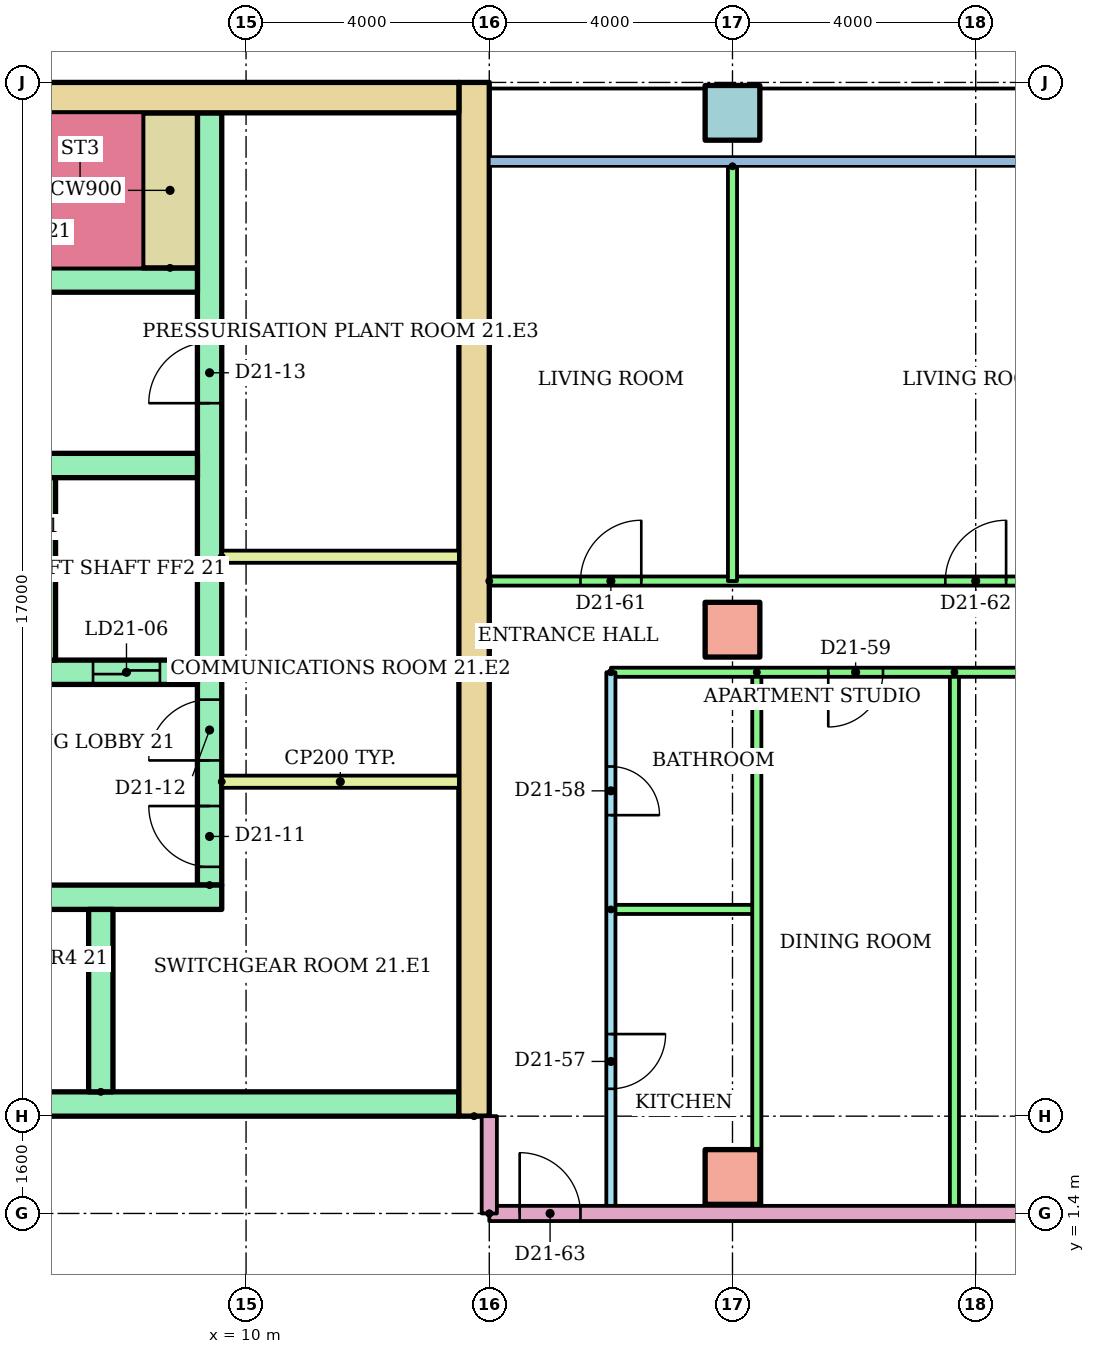
"""IFC4 building model, lengths in metres.
Left out: names, types, materials, properties, quantities, classifications, styles, units other than length and angle.
Written with IfcOpenShell. Run it as: python <this file> out.ifc"""

import sys

from ifc_helpers import new_model, si_unit, direction, frame, frame_2d, origin, origin_2d, place, context, subcontext, project, spatial, rectangle, hollow_rectangle, extrude, element, fill, save


model = new_model("IFC4")
c1 = context("Model", 3, precision=1e-05, world=origin(), true_north=direction((0.0, 1.0)))
c2 = subcontext(c1, "Body", "Model", "MODEL_VIEW")
j1 = project(units=[si_unit("LENGTHUNIT", "METRE"), si_unit("PLANEANGLEUNIT", "RADIAN")], contexts=[c1])
p1 = place(None, origin())
s1 = spatial("IfcSite", under=j1, at=p1, CompositionType="ELEMENT")
p2 = place(p1, origin())
s2 = spatial("IfcBuilding", under=s1, at=p2, CompositionType="ELEMENT")
p3 = place(p2, frame((0.0, 0.0, 83.9)))
s3 = spatial("IfcBuildingStorey", under=s2, at=p3, CompositionType="ELEMENT", Elevation=83.9)
for number, where in (
    (1, (18.0, 2.0, 0.0)),
    (2, (18.0, 11.0, 0.0)),
):
    element("IfcColumn", number, at=place(p3, frame(where)), inside=s3, PredefinedType="COLUMN", context=c2, shape_type="SweptSolid", body=[
        extrude(rectangle(XDim=0.9, YDim=0.9, at=origin_2d()), origin(), (0.0, 0.0, 1.0), 3.2),
    ])
p4 = place(p3, frame((18.0, 19.5, 0.0)))
e3 = element("IfcColumn", 3, at=p4, inside=s3, PredefinedType="COLUMN", context=c2, shape_type="SweptSolid", body=[
    extrude(hollow_rectangle(XDim=0.9, YDim=0.9, WallThickness=0.045, at=origin_2d()), origin(), (0.0, 0.0, 1.0), 3.2),
])
p5 = place(p3, frame((13.75, 3.0, 0.0), z_axis=(0.0, 0.0, 1.0), x_axis=(0.0, 1.0, 0.0)))
e4 = element("IfcWall", 4, at=p5, inside=s3, PredefinedType="SHEAR", context=c2, shape_type="SweptSolid", body=[
    extrude(rectangle(XDim=17.0, YDim=0.5, at=frame_2d((8.5, 0.0))), origin(), (0.0, 0.0, 1.0), 2.92),
])
p6 = place(p3, frame((-13.5, 19.75, 0.0)))
e5 = element("IfcWall", 5, at=p6, inside=s3, PredefinedType="SHEAR", context=c2, shape_type="SweptSolid", body=[
    extrude(rectangle(XDim=27.0, YDim=0.5, at=frame_2d((13.5, 0.0))), origin(), (0.0, 0.0, 1.0), 2.92),
])
p7 = place(p3, frame((9.4, 6.8, 0.0), z_axis=(0.0, 0.0, 1.0), x_axis=(0.0, 1.0, 0.0)))
e6 = element("IfcWall", 6, at=p7, inside=s3, PredefinedType="SHEAR", context=c2, shape_type="SweptSolid", body=[
    extrude(rectangle(XDim=12.7, YDim=0.4, at=frame_2d((6.35, 0.0))), origin(), (0.0, 0.0, 1.0), 2.92),
])
p8 = place(p7, frame((0.3, 0.0, 0.0)))
e7 = element("IfcOpeningElement", 7, at=p8, cuts=e6, PredefinedType="OPENING", context=c2, shape_type="SweptSolid", body=[
    extrude(rectangle(XDim=1.0, YDim=2.1, at=frame_2d((0.5, 1.05))), frame((0.0, 0.21, 0.0), z_axis=(0.0, -1.0, 0.0), x_axis=(1.0, 0.0, 0.0)), (0.0, 0.0, 1.0), 0.42),
])
p9 = place(p7, frame((2.05, 0.0, 0.0)))
e8 = element("IfcOpeningElement", 8, at=p9, cuts=e6, PredefinedType="OPENING", context=c2, shape_type="SweptSolid", body=[
    extrude(rectangle(XDim=1.0, YDim=2.1, at=frame_2d((0.5, 1.05))), frame((0.0, 0.21, 0.0), z_axis=(0.0, -1.0, 0.0), x_axis=(1.0, 0.0, 0.0)), (0.0, 0.0, 1.0), 0.42),
])
p10 = place(p7, frame((7.925, 0.0, 0.0)))
e9 = element("IfcOpeningElement", 9, at=p10, cuts=e6, PredefinedType="OPENING", context=c2, shape_type="SweptSolid", body=[
    extrude(rectangle(XDim=1.0, YDim=2.1, at=frame_2d((0.5, 1.05))), frame((0.0, 0.21, 0.0), z_axis=(0.0, -1.0, 0.0), x_axis=(1.0, 0.0, 0.0)), (0.0, 0.0, 1.0), 0.42),
])
p11 = place(p3, frame((-13.5, 3.2, 0.0)))
e10 = element("IfcWall", 10, at=p11, inside=s3, PredefinedType="SHEAR", context=c2, shape_type="SweptSolid", body=[
    extrude(rectangle(XDim=27.0, YDim=0.4, at=frame_2d((13.5, 0.0))), origin(), (0.0, 0.0, 1.0), 2.92),
])
p12 = place(p11, frame((6.861, 0.0, 0.0)))
e11 = element("IfcOpeningElement", 11, at=p12, cuts=e10, PredefinedType="OPENING", context=c2, shape_type="SweptSolid", body=[
    extrude(rectangle(XDim=1.1, YDim=2.1, at=frame_2d((0.55, 1.05))), frame((0.0, 0.21, 0.0), z_axis=(0.0, -1.0, 0.0), x_axis=(1.0, 0.0, 0.0)), (0.0, 0.0, 1.0), 0.42),
])
p13 = place(p11, frame((9.906, 0.0, 0.0)))
e12 = element("IfcOpeningElement", 12, at=p13, cuts=e10, PredefinedType="OPENING", context=c2, shape_type="SweptSolid", body=[
    extrude(rectangle(XDim=1.1, YDim=2.1, at=frame_2d((0.55, 1.05))), frame((0.0, 0.21, 0.0), z_axis=(0.0, -1.0, 0.0), x_axis=(1.0, 0.0, 0.0)), (0.0, 0.0, 1.0), 0.42),
])
p14 = place(p11, frame((15.994, 0.0, 0.0)))
e13 = element("IfcOpeningElement", 13, at=p14, cuts=e10, PredefinedType="OPENING", context=c2, shape_type="SweptSolid", body=[
    extrude(rectangle(XDim=1.1, YDim=2.1, at=frame_2d((0.55, 1.05))), frame((0.0, 0.21, 0.0), z_axis=(0.0, -1.0, 0.0), x_axis=(1.0, 0.0, 0.0)), (0.0, 0.0, 1.0), 0.42),
])
p15 = place(p11, frame((19.039, 0.0, 0.0)))
e14 = element("IfcOpeningElement", 14, at=p15, cuts=e10, PredefinedType="OPENING", context=c2, shape_type="SweptSolid", body=[
    extrude(rectangle(XDim=1.1, YDim=2.1, at=frame_2d((0.55, 1.05))), frame((0.0, 0.21, 0.0), z_axis=(0.0, -1.0, 0.0), x_axis=(1.0, 0.0, 0.0)), (0.0, 0.0, 1.0), 0.42),
])
p16 = place(p11, frame((12.6, 0.0, 0.0)))
e15 = element("IfcOpeningElement", 15, at=p16, cuts=e10, PredefinedType="OPENING", context=c2, shape_type="SweptSolid", body=[
    extrude(rectangle(XDim=1.8, YDim=2.1, at=frame_2d((0.9, 1.05))), frame((0.0, 0.21, 0.0), z_axis=(0.0, -1.0, 0.0), x_axis=(1.0, 0.0, 0.0)), (0.0, 0.0, 1.0), 0.42),
])
p17 = place(p3, frame((1.522, 6.6, 0.0)))
e16 = element("IfcWall", 16, at=p17, inside=s3, PredefinedType="SHEAR", context=c2, shape_type="SweptSolid", body=[
    extrude(rectangle(XDim=8.078, YDim=0.4, at=frame_2d((4.039, 0.0))), origin(), (0.0, 0.0, 1.0), 2.92),
])
p18 = place(p3, frame((7.611, 3.4, 0.0), z_axis=(0.0, 0.0, 1.0), x_axis=(0.0, 1.0, 0.0)))
e17 = element("IfcWall", 17, at=p18, inside=s3, PredefinedType="SHEAR", context=c2, shape_type="SweptSolid", body=[
    extrude(rectangle(XDim=3.0, YDim=0.4, at=frame_2d((1.5, 0.0))), origin(), (0.0, 0.0, 1.0), 2.92),
])
p19 = place(p3, frame((1.2, 10.3, 0.0)))
e18 = element("IfcWall", 18, at=p19, inside=s3, PredefinedType="SHEAR", context=c2, shape_type="SweptSolid", body=[
    extrude(rectangle(XDim=8.0, YDim=0.4, at=frame_2d((4.0, 0.0))), origin(), (0.0, 0.0, 1.0), 2.92),
])
p20 = place(p19, frame((3.55, 0.0, 0.0)))
e19 = element("IfcOpeningElement", 19, at=p20, cuts=e18, PredefinedType="OPENING", context=c2, shape_type="SweptSolid", body=[
    extrude(rectangle(XDim=1.1, YDim=2.1, at=frame_2d((0.55, 1.05))), frame((0.0, 0.21, 0.0), z_axis=(0.0, -1.0, 0.0), x_axis=(1.0, 0.0, 0.0)), (0.0, 0.0, 1.0), 0.42),
])
p21 = place(p19, frame((6.283, 0.0, 0.0)))
e20 = element("IfcOpeningElement", 20, at=p21, cuts=e18, PredefinedType="OPENING", context=c2, shape_type="SweptSolid", body=[
    extrude(rectangle(XDim=1.1, YDim=2.1, at=frame_2d((0.55, 1.05))), frame((0.0, 0.21, 0.0), z_axis=(0.0, -1.0, 0.0), x_axis=(1.0, 0.0, 0.0)), (0.0, 0.0, 1.0), 0.42),
])
p22 = place(p19, frame((0.867, 0.0, 0.0)))
e21 = element("IfcOpeningElement", 21, at=p22, cuts=e18, PredefinedType="OPENING", context=c2, shape_type="SweptSolid", body=[
    extrude(rectangle(XDim=1.0, YDim=2.1, at=frame_2d((0.5, 1.05))), frame((0.0, 0.21, 0.0), z_axis=(0.0, -1.0, 0.0), x_axis=(1.0, 0.0, 0.0)), (0.0, 0.0, 1.0), 0.42),
])
p23 = place(p3, frame((1.2, 13.7, 0.0)))
e22 = element("IfcWall", 22, at=p23, inside=s3, PredefinedType="SHEAR", context=c2, shape_type="SweptSolid", body=[
    extrude(rectangle(XDim=8.0, YDim=0.4, at=frame_2d((4.0, 0.0))), origin(), (0.0, 0.0, 1.0), 2.92),
])
p24 = place(p3, frame((6.667, 10.5, 0.0), z_axis=(0.0, 0.0, 1.0), x_axis=(0.0, 1.0, 0.0)))
e23 = element("IfcWall", 23, at=p24, inside=s3, PredefinedType="SHEAR", context=c2, shape_type="SweptSolid", body=[
    extrude(rectangle(XDim=3.0, YDim=0.4, at=frame_2d((1.5, 0.0))), origin(), (0.0, 0.0, 1.0), 2.92),
])
p25 = place(p3, frame((-9.2, 16.75, 0.0)))
e24 = element("IfcWall", 24, at=p25, inside=s3, PredefinedType="SHEAR", context=c2, shape_type="SweptSolid", body=[
    extrude(rectangle(XDim=18.4, YDim=0.4, at=frame_2d((9.2, 0.0))), origin(), (0.0, 0.0, 1.0), 2.92),
])
p26 = place(p25, frame((0.1, 0.0, 0.0)))
e25 = element("IfcOpeningElement", 25, at=p26, cuts=e24, PredefinedType="OPENING", context=c2, shape_type="SweptSolid", body=[
    extrude(rectangle(XDim=0.95, YDim=2.1, at=frame_2d((0.475, 1.05))), frame((0.0, 0.21, 0.0), z_axis=(0.0, -1.0, 0.0), x_axis=(1.0, 0.0, 0.0)), (0.0, 0.0, 1.0), 0.42),
])
p27 = place(p25, frame((6.1, 0.0, 0.0)))
e26 = element("IfcOpeningElement", 26, at=p27, cuts=e24, PredefinedType="OPENING", context=c2, shape_type="SweptSolid", body=[
    extrude(rectangle(XDim=0.95, YDim=2.1, at=frame_2d((0.475, 1.05))), frame((0.0, 0.21, 0.0), z_axis=(0.0, -1.0, 0.0), x_axis=(1.0, 0.0, 0.0)), (0.0, 0.0, 1.0), 0.42),
])
p28 = place(p25, frame((12.1, 0.0, 0.0)))
e27 = element("IfcOpeningElement", 27, at=p28, cuts=e24, PredefinedType="OPENING", context=c2, shape_type="SweptSolid", body=[
    extrude(rectangle(XDim=0.95, YDim=2.1, at=frame_2d((0.475, 1.05))), frame((0.0, 0.21, 0.0), z_axis=(0.0, -1.0, 0.0), x_axis=(1.0, 0.0, 0.0)), (0.0, 0.0, 1.0), 0.42),
])
p29 = place(p3, frame((8.75, 16.95, 0.0), z_axis=(0.0, 0.0, 1.0), x_axis=(0.0, 1.0, 0.0)))
e28 = element("IfcWall", 28, at=p29, inside=s3, PredefinedType="SHEAR", context=c2, shape_type="SweptSolid", body=[
    extrude(rectangle(XDim=2.55, YDim=0.9, at=frame_2d((1.275, 0.0))), origin(), (0.0, 0.0, 1.0), 2.92),
])
for number, where in (
    (29, (9.6, 8.5, 0.0)),
    (30, (9.6, 12.2, 0.0)),
):
    element("IfcWall", number, at=place(p3, frame(where)), inside=s3, PredefinedType="PARTITIONING", context=c2, shape_type="SweptSolid", body=[
        extrude(rectangle(XDim=3.9, YDim=0.2, at=frame_2d((1.95, 0.0))), origin(), (0.0, 0.0, 1.0), 2.92),
    ])
p30 = place(p3, frame((16.0, 10.3, 0.0), z_axis=(0.0, 0.0, 1.0), x_axis=(0.0, -1.0, 0.0)))
e31 = element("IfcWall", 31, at=p30, inside=s3, PredefinedType="PARTITIONING", context=c2, shape_type="SweptSolid", body=[
    extrude(rectangle(XDim=8.9, YDim=0.15, at=frame_2d((4.45, 0.0))), origin(), (0.0, 0.0, 1.0), 2.4),
])
p31 = place(p30, frame((5.95, 0.0, 0.0)))
e32 = element("IfcOpeningElement", 32, at=p31, cuts=e31, PredefinedType="OPENING", context=c2, shape_type="SweptSolid", body=[
    extrude(rectangle(XDim=0.9, YDim=2.1, at=frame_2d((0.45, 1.05))), frame((0.0, 0.085, 0.0), z_axis=(0.0, -1.0, 0.0), x_axis=(1.0, 0.0, 0.0)), (0.0, 0.0, 1.0), 0.17),
])
p32 = place(p30, frame((1.55, 0.0, 0.0)))
e33 = element("IfcOpeningElement", 33, at=p32, cuts=e31, PredefinedType="OPENING", context=c2, shape_type="SweptSolid", body=[
    extrude(rectangle(XDim=0.8, YDim=2.1, at=frame_2d((0.4, 1.05))), frame((0.0, 0.085, 0.0), z_axis=(0.0, -1.0, 0.0), x_axis=(1.0, 0.0, 0.0)), (0.0, 0.0, 1.0), 0.17),
])
p33 = place(p3, frame((16.0, 6.4, 0.0)))
e34 = element("IfcWall", 34, at=p33, inside=s3, PredefinedType="PARTITIONING", context=c2, shape_type="SweptSolid", body=[
    extrude(rectangle(XDim=2.4, YDim=0.15, at=frame_2d((1.2, 0.0))), origin(), (0.0, 0.0, 1.0), 2.4),
])
for number, where, z_axis, x_axis in (
    (35, (18.4, 10.3, 0.0), (0.0, 0.0, 1.0), (0.0, -1.0, 0.0)),
    (36, (21.65, 10.3, 0.0), (0.0, 0.0, 1.0), (0.0, -1.0, 0.0)),
):
    element("IfcWall", number, at=place(p3, frame(where, z_axis=z_axis, x_axis=x_axis)), inside=s3, PredefinedType="PARTITIONING", context=c2, shape_type="SweptSolid", body=[
        extrude(rectangle(XDim=8.9, YDim=0.15, at=frame_2d((4.45, 0.0))), origin(), (0.0, 0.0, 1.0), 2.4),
    ])
p34 = place(p3, frame((26.0, 10.3, 0.0), z_axis=(0.0, 0.0, 1.0), x_axis=(-1.0, 0.0, 0.0)))
e37 = element("IfcWall", 37, at=p34, inside=s3, PredefinedType="PARTITIONING", context=c2, shape_type="SweptSolid", body=[
    extrude(rectangle(XDim=10.0, YDim=0.15, at=frame_2d((5.0, 0.0))), origin(), (0.0, 0.0, 1.0), 2.4),
])
p35 = place(p34, frame((5.525, 0.0, 0.0)))
e38 = element("IfcOpeningElement", 38, at=p35, cuts=e37, PredefinedType="OPENING", context=c2, shape_type="SweptSolid", body=[
    extrude(rectangle(XDim=0.9, YDim=2.1, at=frame_2d((0.45, 1.05))), frame((0.0, 0.085, 0.0), z_axis=(0.0, -1.0, 0.0), x_axis=(1.0, 0.0, 0.0)), (0.0, 0.0, 1.0), 0.17),
])
p36 = place(p34, frame((1.725, 0.0, 0.0)))
e39 = element("IfcOpeningElement", 39, at=p36, cuts=e37, PredefinedType="OPENING", context=c2, shape_type="SweptSolid", body=[
    extrude(rectangle(XDim=0.9, YDim=2.1, at=frame_2d((0.45, 1.05))), frame((0.0, 0.085, 0.0), z_axis=(0.0, -1.0, 0.0), x_axis=(1.0, 0.0, 0.0)), (0.0, 0.0, 1.0), 0.17),
])
p37 = place(p3, frame((14.0, 11.8, 0.0)))
e40 = element("IfcWall", 40, at=p37, inside=s3, PredefinedType="PARTITIONING", context=c2, shape_type="SweptSolid", body=[
    extrude(rectangle(XDim=12.0, YDim=0.15, at=frame_2d((6.0, 0.0))), origin(), (0.0, 0.0, 1.0), 2.4),
])
p38 = place(p37, frame((1.5, 0.0, 0.0)))
e41 = element("IfcOpeningElement", 41, at=p38, cuts=e40, PredefinedType="OPENING", context=c2, shape_type="SweptSolid", body=[
    extrude(rectangle(XDim=1.0, YDim=2.1, at=frame_2d((0.5, 1.05))), frame((0.0, 0.085, 0.0), z_axis=(0.0, -1.0, 0.0), x_axis=(1.0, 0.0, 0.0)), (0.0, 0.0, 1.0), 0.17),
])
p39 = place(p37, frame((7.5, 0.0, 0.0)))
e42 = element("IfcOpeningElement", 42, at=p39, cuts=e40, PredefinedType="OPENING", context=c2, shape_type="SweptSolid", body=[
    extrude(rectangle(XDim=1.0, YDim=2.1, at=frame_2d((0.5, 1.05))), frame((0.0, 0.085, 0.0), z_axis=(0.0, -1.0, 0.0), x_axis=(1.0, 0.0, 0.0)), (0.0, 0.0, 1.0), 0.17),
])
p40 = place(p3, frame((18.0, 18.621, 0.0), z_axis=(0.0, 0.0, 1.0), x_axis=(0.0, -1.0, 0.0)))
e43 = element("IfcWall", 43, at=p40, inside=s3, PredefinedType="PARTITIONING", context=c2, shape_type="SweptSolid", body=[
    extrude(rectangle(XDim=6.821, YDim=0.15, at=frame_2d((3.411, 0.0))), origin(), (0.0, 0.0, 1.0), 2.4),
])
p41 = place(p3, frame((14.0, 1.4, 0.0)))
e44 = element("IfcWall", 44, at=p41, inside=s3, PredefinedType="PARTITIONING", context=c2, shape_type="SweptSolid", body=[
    extrude(rectangle(XDim=15.0, YDim=0.25, at=frame_2d((7.5, 0.0))), origin(), (0.0, 0.0, 1.0), 2.4),
])
p42 = place(p41, frame((0.5, 0.0, 0.0)))
e45 = element("IfcOpeningElement", 45, at=p42, cuts=e44, PredefinedType="OPENING", context=c2, shape_type="SweptSolid", body=[
    extrude(rectangle(XDim=1.0, YDim=2.1, at=frame_2d((0.5, 1.05))), frame((0.0, 0.135, 0.0), z_axis=(0.0, -1.0, 0.0), x_axis=(1.0, 0.0, 0.0)), (0.0, 0.0, 1.0), 0.27),
])
p43 = place(p41, frame((12.689, 0.0, 0.0)))
e46 = element("IfcOpeningElement", 46, at=p43, cuts=e44, PredefinedType="OPENING", context=c2, shape_type="SweptSolid", body=[
    extrude(rectangle(XDim=1.0, YDim=2.1, at=frame_2d((0.5, 1.05))), frame((0.0, 0.135, 0.0), z_axis=(0.0, -1.0, 0.0), x_axis=(1.0, 0.0, 0.0)), (0.0, 0.0, 1.0), 0.27),
])
p44 = place(p3, frame((14.0, 1.4, 0.0), z_axis=(0.0, 0.0, 1.0), x_axis=(0.0, 1.0, 0.0)))
e47 = element("IfcWall", 47, at=p44, inside=s3, PredefinedType="PARTITIONING", context=c2, shape_type="SweptSolid", body=[
    extrude(rectangle(XDim=1.6, YDim=0.25, at=frame_2d((0.8, 0.0))), origin(), (0.0, 0.0, 1.0), 2.4),
])
p45 = place(p21, origin())
e48 = element("IfcDoor", 48, at=p45, inside=s3, OperationType="SLIDING_TO_LEFT", PredefinedType="DOOR", context=c2, shape_type="SweptSolid", body=[
    extrude(rectangle(XDim=1.1, YDim=2.1, at=frame_2d((0.55, 1.05))), frame((0.0, 0.025, 0.0), z_axis=(0.0, -1.0, 0.0), x_axis=(1.0, 0.0, 0.0)), (0.0, 0.0, 1.0), 0.05),
])
fill(e20, e48)
p46 = place(p8, origin())
e49 = element("IfcDoor", 49, at=p46, inside=s3, OperationType="SINGLE_SWING_RIGHT", PredefinedType="DOOR", context=c2, shape_type="SweptSolid", body=[
    extrude(rectangle(XDim=1.0, YDim=2.1, at=frame_2d((0.5, 1.05))), frame((0.0, 0.025, 0.0), z_axis=(0.0, -1.0, 0.0), x_axis=(1.0, 0.0, 0.0)), (0.0, 0.0, 1.0), 0.05),
])
fill(e7, e49)
p47 = place(p9, origin())
e50 = element("IfcDoor", 50, at=p47, inside=s3, OperationType="SINGLE_SWING_LEFT", PredefinedType="DOOR", context=c2, shape_type="SweptSolid", body=[
    extrude(rectangle(XDim=1.0, YDim=2.1, at=frame_2d((0.5, 1.05))), frame((0.0, 0.025, 0.0), z_axis=(0.0, -1.0, 0.0), x_axis=(1.0, 0.0, 0.0)), (0.0, 0.0, 1.0), 0.05),
])
fill(e8, e50)
p48 = place(p10, origin())
e51 = element("IfcDoor", 51, at=p48, inside=s3, OperationType="SINGLE_SWING_LEFT", PredefinedType="DOOR", context=c2, shape_type="SweptSolid", body=[
    extrude(rectangle(XDim=1.0, YDim=2.1, at=frame_2d((0.5, 1.05))), frame((0.0, 0.025, 0.0), z_axis=(0.0, -1.0, 0.0), x_axis=(1.0, 0.0, 0.0)), (0.0, 0.0, 1.0), 0.05),
])
fill(e9, e51)
p49 = place(p31, origin())
e52 = element("IfcDoor", 52, at=p49, inside=s3, OperationType="SINGLE_SWING_LEFT", PredefinedType="DOOR", context=c2, shape_type="SweptSolid", body=[
    extrude(rectangle(XDim=0.9, YDim=2.1, at=frame_2d((0.45, 1.05))), frame((0.0, 0.025, 0.0), z_axis=(0.0, -1.0, 0.0), x_axis=(1.0, 0.0, 0.0)), (0.0, 0.0, 1.0), 0.05),
])
fill(e32, e52)
p50 = place(p32, origin())
e53 = element("IfcDoor", 53, at=p50, inside=s3, OperationType="SINGLE_SWING_RIGHT", PredefinedType="DOOR", context=c2, shape_type="SweptSolid", body=[
    extrude(rectangle(XDim=0.8, YDim=2.1, at=frame_2d((0.4, 1.05))), frame((0.0, 0.025, 0.0), z_axis=(0.0, -1.0, 0.0), x_axis=(1.0, 0.0, 0.0)), (0.0, 0.0, 1.0), 0.05),
])
fill(e33, e53)
p51 = place(p35, origin())
e54 = element("IfcDoor", 54, at=p51, inside=s3, OperationType="SINGLE_SWING_RIGHT", PredefinedType="DOOR", context=c2, shape_type="SweptSolid", body=[
    extrude(rectangle(XDim=0.9, YDim=2.1, at=frame_2d((0.45, 1.05))), frame((0.0, 0.025, 0.0), z_axis=(0.0, -1.0, 0.0), x_axis=(1.0, 0.0, 0.0)), (0.0, 0.0, 1.0), 0.05),
])
fill(e38, e54)
p52 = place(p38, origin())
e55 = element("IfcDoor", 55, at=p52, inside=s3, OperationType="SINGLE_SWING_RIGHT", PredefinedType="DOOR", context=c2, shape_type="SweptSolid", body=[
    extrude(rectangle(XDim=1.0, YDim=2.1, at=frame_2d((0.5, 1.05))), frame((0.0, 0.025, 0.0), z_axis=(0.0, -1.0, 0.0), x_axis=(1.0, 0.0, 0.0)), (0.0, 0.0, 1.0), 0.05),
])
fill(e41, e55)
p53 = place(p39, origin())
e56 = element("IfcDoor", 56, at=p53, inside=s3, OperationType="SINGLE_SWING_RIGHT", PredefinedType="DOOR", context=c2, shape_type="SweptSolid", body=[
    extrude(rectangle(XDim=1.0, YDim=2.1, at=frame_2d((0.5, 1.05))), frame((0.0, 0.025, 0.0), z_axis=(0.0, -1.0, 0.0), x_axis=(1.0, 0.0, 0.0)), (0.0, 0.0, 1.0), 0.05),
])
fill(e42, e56)
p54 = place(p42, origin())
e57 = element("IfcDoor", 57, at=p54, inside=s3, OperationType="SINGLE_SWING_LEFT", PredefinedType="DOOR", context=c2, shape_type="SweptSolid", body=[
    extrude(rectangle(XDim=1.0, YDim=2.1, at=frame_2d((0.5, 1.05))), frame((0.0, 0.025, 0.0), z_axis=(0.0, -1.0, 0.0), x_axis=(1.0, 0.0, 0.0)), (0.0, 0.0, 1.0), 0.05),
])
fill(e45, e57)
save(model, sys.argv[1])
